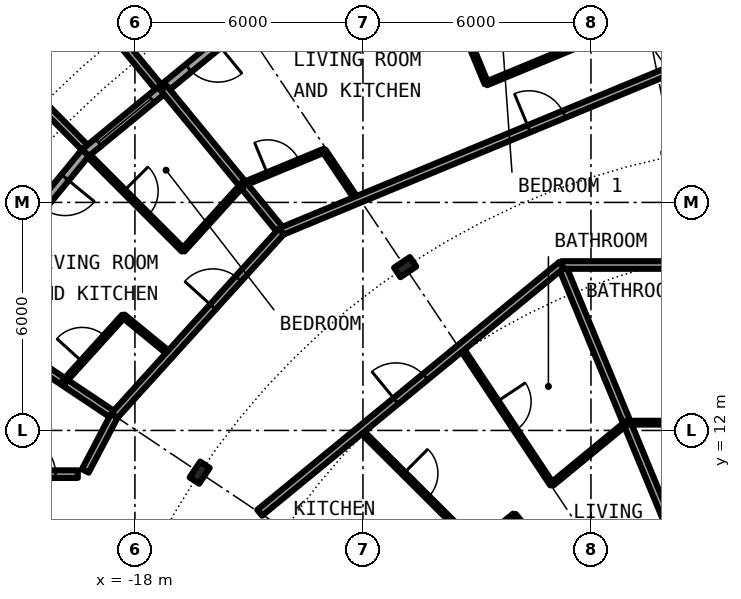
"""IFC4 building model, lengths in metres.
Left out: names, types, materials, properties, quantities, classifications, styles, units other than length and angle.
Written with IfcOpenShell. Run it as: python <this file> out.ifc"""

import sys

from ifc_helpers import new_model, si_unit, direction, frame, frame_2d, origin, origin_2d, place, context, subcontext, project, spatial, rectangle, circle, i_section, extrude, element, fill, save


model = new_model("IFC4")
c1 = context("Model", 3, precision=1e-05, world=origin(), true_north=direction((0.0, 1.0)))
c2 = subcontext(c1, "Body", "Model", "MODEL_VIEW")
j1 = project(units=[si_unit("LENGTHUNIT", "METRE"), si_unit("PLANEANGLEUNIT", "RADIAN")], contexts=[c1])
p1 = place(None, origin())
s1 = spatial("IfcSite", under=j1, at=p1, CompositionType="ELEMENT")
p2 = place(p1, origin())
s2 = spatial("IfcBuilding", under=s1, at=p2, CompositionType="ELEMENT")
p3 = place(p2, frame((0.0, 0.0, 173.8)))
s3 = spatial("IfcBuildingStorey", under=s2, at=p3, CompositionType="ELEMENT", Elevation=173.8)
for number, where, z_axis, x_axis in (
    (1, (-10.889, 16.297, 0.0), (0.0, 0.0, 1.0), (-0.556, 0.831, 0.0)),
    (2, (-16.297, 10.889, 0.0), (0.0, 0.0, 1.0), (-0.831, 0.556, 0.0)),
):
    element("IfcColumn", number, at=place(p3, frame(where, z_axis=z_axis, x_axis=x_axis)), inside=s3, PredefinedType="COLUMN", context=c2, shape_type="SweptSolid", body=[
        extrude(i_section(OverallWidth=0.3, OverallDepth=0.5, WebThickness=0.014, FlangeThickness=0.028, FilletRadius=0.027, at=origin_2d()), origin(), (0.0, 0.0, 1.0), 3.05),
    ])
p4 = place(p3, frame((-15.167, 22.699, 0.0), z_axis=(0.0, 0.0, 1.0), x_axis=(-0.773019449054, -0.634382322723, 0.0)))
e3 = element("IfcWall", 3, at=p4, inside=s3, PredefinedType="SOLIDWALL", context=c2, shape_type="SweptSolid", body=[
    extrude(rectangle(XDim=5.352, YDim=0.25, at=frame_2d((2.676, 0.0))), origin(), (0.0, 0.0, 1.0), 2.7),
])
p5 = place(p4, frame((0.841, 0.0, 0.0)))
e4 = element("IfcOpeningElement", 4, at=p5, cuts=e3, PredefinedType="OPENING", context=c2, shape_type="SweptSolid", body=[
    extrude(rectangle(XDim=1.0, YDim=2.2, at=frame_2d((0.5, 1.1))), frame((0.0, 0.135, 0.0), z_axis=(0.0, -1.0, 0.0), x_axis=(1.0, 0.0, 0.0)), (0.0, 0.0, 1.0), 0.27),
])
p6 = place(p4, frame((3.111, 0.0, 0.3)))
e5 = element("IfcOpeningElement", 5, at=p6, cuts=e3, PredefinedType="OPENING", context=c2, shape_type="SweptSolid", body=[
    extrude(rectangle(XDim=1.8, YDim=2.1, at=frame_2d((0.9, 1.05))), frame((0.0, 0.135, 0.0), z_axis=(0.0, -1.0, 0.0), x_axis=(1.0, 0.0, 0.0)), (0.0, 0.0, 1.0), 0.27),
])
p7 = place(p3, frame((-19.282, 23.503, -0.03), z_axis=(0.0, 0.0, 1.0), x_axis=(-0.740998365753, -0.671506829416, 0.0)))
e6 = element("IfcWall", 6, at=p7, inside=s3, PredefinedType="SOLIDWALL", context=c2, shape_type="SweptSolid", body=[
    extrude(rectangle(XDim=2.993, YDim=0.2, at=frame_2d((1.497, 0.0))), origin(), (0.0, 0.0, 1.0), 2.73),
])
p8 = place(p7, frame((0.457, 0.0, 0.33)))
e7 = element("IfcOpeningElement", 7, at=p8, cuts=e6, PredefinedType="OPENING", context=c2, shape_type="SweptSolid", body=[
    extrude(circle(Radius=1.04, at=frame_2d((1.04, 1.04))), frame((0.0, 0.11, 0.0), z_axis=(0.0, -1.0, 0.0), x_axis=(1.0, 0.0, 0.0)), (0.0, 0.0, 1.0), 0.22),
])
p9 = place(p3, frame((-17.384, 21.041, -0.03), z_axis=(0.0, 0.0, 1.0), x_axis=(-0.63709551667, 0.770784861449, 0.0)))
e8 = element("IfcWall", 8, at=p9, inside=s3, PredefinedType="SOLIDWALL", context=c2, shape_type="SweptSolid", body=[
    extrude(rectangle(XDim=3.006, YDim=0.2, at=frame_2d((1.503, 0.0))), origin(), (0.0, 0.0, 1.0), 2.73),
])
p10 = place(p3, frame((-19.323, 19.45, -0.03), z_axis=(0.0, 0.0, 1.0), x_axis=(-0.704476739375, 0.709727076896, 0.0)))
e9 = element("IfcWall", 9, at=p10, inside=s3, PredefinedType="SOLIDWALL", context=c2, shape_type="SweptSolid", body=[
    extrude(rectangle(XDim=2.883, YDim=0.2, at=frame_2d((1.441, 0.0))), origin(), (0.0, 0.0, 1.0), 2.73),
])
p11 = place(p3, frame((-19.304, 19.304, 0.0), z_axis=(0.0, 0.0, 1.0), x_axis=(-0.634382322723, -0.773019449054, 0.0)))
e10 = element("IfcWall", 10, at=p11, inside=s3, PredefinedType="SOLIDWALL", context=c2, shape_type="SweptSolid", body=[
    extrude(rectangle(XDim=5.352, YDim=0.25, at=frame_2d((2.676, 0.0))), origin(), (0.0, 0.0, 1.0), 2.7),
])
p12 = place(p11, frame((0.841, 0.0, 0.0)))
e11 = element("IfcOpeningElement", 11, at=p12, cuts=e10, PredefinedType="OPENING", context=c2, shape_type="SweptSolid", body=[
    extrude(rectangle(XDim=1.0, YDim=2.2, at=frame_2d((0.5, 1.1))), frame((0.0, 0.135, 0.0), z_axis=(0.0, -1.0, 0.0), x_axis=(1.0, 0.0, 0.0)), (0.0, 0.0, 1.0), 0.27),
])
p13 = place(p11, frame((3.111, 0.0, 0.3)))
e12 = element("IfcOpeningElement", 12, at=p13, cuts=e10, PredefinedType="OPENING", context=c2, shape_type="SweptSolid", body=[
    extrude(rectangle(XDim=1.8, YDim=2.1, at=frame_2d((0.9, 1.05))), frame((0.0, 0.135, 0.0), z_axis=(0.0, -1.0, 0.0), x_axis=(1.0, 0.0, 0.0)), (0.0, 0.0, 1.0), 0.27),
])
p14 = place(p3, frame((-8.019, 9.771, 0.0), z_axis=(0.0, 0.0, 1.0), x_axis=(0.633851064378, -0.773455123577, 0.0)))
e13 = element("IfcWall", 13, at=p14, inside=s3, PredefinedType="PARTITIONING", context=c2, shape_type="SweptSolid", body=[
    extrude(rectangle(XDim=4.919, YDim=0.1, at=frame_2d((2.46, 0.0))), origin(), (0.0, 0.0, 1.0), 2.7),
])
p15 = place(p14, frame((2.01, 0.0, 0.0)))
e14 = element("IfcOpeningElement", 14, at=p15, cuts=e13, PredefinedType="OPENING", context=c2, shape_type="SweptSolid", body=[
    extrude(rectangle(XDim=0.9, YDim=2.3, at=frame_2d((0.45, 1.15))), frame((0.0, 0.06, 0.0), z_axis=(0.0, -1.0, 0.0), x_axis=(1.0, 0.0, 0.0)), (0.0, 0.0, 1.0), 0.12),
])
p16 = place(p3, frame((-22.595, 15.098, 0.0), z_axis=(0.0, 0.0, 1.0), x_axis=(0.831387096605, -0.55569370664, 0.0)))
e15 = element("IfcWall", 15, at=p16, inside=s3, PredefinedType="PARTITIONING", context=c2, shape_type="SweptSolid", body=[
    extrude(rectangle(XDim=4.875, YDim=0.2, at=frame_2d((2.438, 0.0))), origin(), (0.0, 0.0, 1.0), 2.7),
])
p17 = place(p3, frame((-19.21, 19.222, 0.0), z_axis=(0.0, 0.0, 1.0), x_axis=(0.706967463531, -0.707246071398, 0.0)))
e16 = element("IfcWall", 16, at=p17, inside=s3, PredefinedType="PARTITIONING", context=c2, shape_type="SweptSolid", body=[
    extrude(rectangle(XDim=3.505, YDim=0.1, at=frame_2d((1.752, 0.0))), origin(), (0.0, 0.0, 1.0), 2.7),
])
p18 = place(p17, frame((1.303, 0.0, 0.0)))
e17 = element("IfcOpeningElement", 17, at=p18, cuts=e16, PredefinedType="OPENING", context=c2, shape_type="SweptSolid", body=[
    extrude(rectangle(XDim=0.9, YDim=2.3, at=frame_2d((0.45, 1.15))), frame((0.0, 0.06, 0.0), z_axis=(0.0, -1.0, 0.0), x_axis=(1.0, 0.0, 0.0)), (0.0, 0.0, 1.0), 0.12),
])
p19 = place(p3, frame((-17.24, 21.007, 0.0), z_axis=(0.0, 0.0, 1.0), x_axis=(0.634374159378, -0.773026148273, 0.0)))
e18 = element("IfcWall", 18, at=p19, inside=s3, PredefinedType="PARTITIONING", context=c2, shape_type="SweptSolid", body=[
    extrude(rectangle(XDim=4.876, YDim=0.2, at=frame_2d((2.438, 0.0))), origin(), (0.0, 0.0, 1.0), 2.7),
])
p20 = place(p3, frame((-13.025, 19.36, 0.0), z_axis=(0.0, 0.0, 1.0), x_axis=(0.558121913892, -0.829758958514, 0.0)))
e19 = element("IfcWall", 19, at=p20, inside=s3, PredefinedType="PARTITIONING", context=c2, shape_type="SweptSolid", body=[
    extrude(rectangle(XDim=1.562, YDim=0.1, at=frame_2d((0.781, 0.0))), origin(), (0.0, 0.0, 1.0), 2.7),
])
p21 = place(p3, frame((-12.069, 12.007, 0.0), z_axis=(0.0, 0.0, 1.0), x_axis=(0.708822693149, -0.705386695138, 0.0)))
e20 = element("IfcWall", 20, at=p21, inside=s3, PredefinedType="PARTITIONING", context=c2, shape_type="SweptSolid", body=[
    extrude(rectangle(XDim=4.121, YDim=0.1, at=frame_2d((2.061, 0.0))), origin(), (0.0, 0.0, 1.0), 2.7),
])
p22 = place(p21, frame((1.611, 0.0, 0.0)))
e21 = element("IfcOpeningElement", 21, at=p22, cuts=e20, PredefinedType="OPENING", context=c2, shape_type="SweptSolid", body=[
    extrude(rectangle(XDim=0.9, YDim=2.3, at=frame_2d((0.45, 1.15))), frame((0.0, 0.06, 0.0), z_axis=(0.0, -1.0, 0.0), x_axis=(1.0, 0.0, 0.0)), (0.0, 0.0, 1.0), 0.12),
])
p23 = place(p3, frame((-10.399, 25.106, 0.0), z_axis=(0.0, 0.0, 1.0), x_axis=(0.382689142274, -0.923877167369, 0.0)))
e22 = element("IfcWall", 22, at=p23, inside=s3, PredefinedType="PARTITIONING", context=c2, shape_type="SweptSolid", body=[
    extrude(rectangle(XDim=4.304, YDim=0.1, at=frame_2d((2.152, 0.0))), origin(), (0.0, 0.0, 1.0), 2.7),
])
p24 = place(p23, frame((1.702, 0.0, 0.0)))
e23 = element("IfcOpeningElement", 23, at=p24, cuts=e22, PredefinedType="OPENING", context=c2, shape_type="SweptSolid", body=[
    extrude(rectangle(XDim=0.9, YDim=2.3, at=frame_2d((0.45, 1.15))), frame((0.0, 0.06, 0.0), z_axis=(0.0, -1.0, 0.0), x_axis=(1.0, 0.0, 0.0)), (0.0, 0.0, 1.0), 0.12),
])
p25 = place(p3, frame((-9.421, 14.18, 0.0), z_axis=(0.0, 0.0, 1.0), x_axis=(0.553303732327, -0.832979579457, 0.0)))
e24 = element("IfcWall", 24, at=p25, inside=s3, PredefinedType="PARTITIONING", context=c2, shape_type="SweptSolid", body=[
    extrude(rectangle(XDim=4.319, YDim=0.1, at=frame_2d((2.16, 0.0))), origin(), (0.0, 0.0, 1.0), 2.7),
])
p26 = place(p25, frame((1.71, 0.0, 0.0)))
e25 = element("IfcOpeningElement", 25, at=p26, cuts=e24, PredefinedType="OPENING", context=c2, shape_type="SweptSolid", body=[
    extrude(rectangle(XDim=0.9, YDim=2.3, at=frame_2d((0.45, 1.15))), frame((0.0, 0.06, 0.0), z_axis=(0.0, -1.0, 0.0), x_axis=(1.0, 0.0, 0.0)), (0.0, 0.0, 1.0), 0.12),
])
p27 = place(p3, frame((-6.773, 16.353, 0.0), z_axis=(0.0, 0.0, 1.0), x_axis=(0.382632652025, -0.923900564782, 0.0)))
e26 = element("IfcWall", 26, at=p27, inside=s3, PredefinedType="PARTITIONING", context=c2, shape_type="SweptSolid", body=[
    extrude(rectangle(XDim=9.98, YDim=0.2, at=frame_2d((4.99, 0.0))), origin(), (0.0, 0.0, 1.0), 2.7),
])
p28 = place(p3, frame((-18.302, 15.01, 0.0), z_axis=(0.0, 0.0, 1.0), x_axis=(0.773476341377, -0.633825172528, 0.0)))
e27 = element("IfcWall", 27, at=p28, inside=s3, PredefinedType="PARTITIONING", context=c2, shape_type="SweptSolid", body=[
    extrude(rectangle(XDim=1.584, YDim=0.1, at=frame_2d((0.792, 0.0))), origin(), (0.0, 0.0, 1.0), 2.7),
])
p29 = place(p3, frame((-21.675, 10.85, 0.0), z_axis=(0.0, 0.0, 1.0), x_axis=(1.0, 0.0, 0.0)))
e28 = element("IfcWall", 28, at=p29, inside=s3, PredefinedType="PARTITIONING", context=c2, shape_type="SweptSolid", body=[
    extrude(rectangle(XDim=2.171, YDim=0.2, at=frame_2d((1.085, 0.0))), origin(), (0.0, 0.0, 1.0), 2.7),
])
p30 = place(p29, frame((0.585, 0.0, 0.0)))
e29 = element("IfcOpeningElement", 29, at=p30, cuts=e28, PredefinedType="OPENING", context=c2, shape_type="SweptSolid", body=[
    extrude(rectangle(XDim=1.0, YDim=2.3, at=frame_2d((0.5, 1.15))), frame((0.0, 0.11, 0.0), z_axis=(0.0, -1.0, 0.0), x_axis=(1.0, 0.0, 0.0)), (0.0, 0.0, 1.0), 0.22),
])
p31 = place(p3, frame((-5.055, 12.204, 0.0), z_axis=(0.0, 0.0, 1.0), x_axis=(1.0, 0.0, 0.0)))
e30 = element("IfcWall", 30, at=p31, inside=s3, PredefinedType="PARTITIONING", context=c2, shape_type="SweptSolid", body=[
    extrude(rectangle(XDim=2.528, YDim=0.1, at=frame_2d((1.264, 0.0))), origin(), (0.0, 0.0, 1.0), 2.7),
])
p32 = place(p3, frame((-8.842, 9.095, 0.0), z_axis=(0.0, 0.0, 1.0), x_axis=(0.772730269942, 0.634734534995, 0.0)))
e31 = element("IfcWall", 31, at=p32, inside=s3, PredefinedType="PARTITIONING", context=c2, shape_type="SweptSolid", body=[
    extrude(rectangle(XDim=1.065, YDim=0.1, at=frame_2d((0.532, 0.0))), origin(), (0.0, 0.0, 1.0), 2.7),
])
p33 = place(p3, frame((-7.034, 10.58, 0.0), z_axis=(0.0, 0.0, 1.0), x_axis=(0.772764723682, 0.634692588449, 0.0)))
e32 = element("IfcWall", 32, at=p33, inside=s3, PredefinedType="PARTITIONING", context=c2, shape_type="SweptSolid", body=[
    extrude(rectangle(XDim=2.557, YDim=0.1, at=frame_2d((1.278, 0.0))), origin(), (0.0, 0.0, 1.0), 2.7),
])
p34 = place(p3, frame((-6.773, 16.353, 0.0), z_axis=(0.0, 0.0, 1.0), x_axis=(1.0, 0.0, 0.0)))
e33 = element("IfcWall", 33, at=p34, inside=s3, PredefinedType="PARTITIONING", context=c2, shape_type="SweptSolid", body=[
    extrude(rectangle(XDim=13.546, YDim=0.2, at=frame_2d((6.773, 0.0))), origin(), (0.0, 0.0, 1.0), 2.7),
])
p35 = place(p34, frame((4.579, 0.0, 0.0)))
e34 = element("IfcOpeningElement", 34, at=p35, cuts=e33, PredefinedType="OPENING", context=c2, shape_type="SweptSolid", body=[
    extrude(rectangle(XDim=1.0, YDim=2.3, at=frame_2d((0.5, 1.15))), frame((0.0, 0.11, 0.0), z_axis=(0.0, -1.0, 0.0), x_axis=(1.0, 0.0, 0.0)), (0.0, 0.0, 1.0), 0.22),
])
p36 = place(p3, frame((-14.717, 9.834, 0.0), z_axis=(0.0, 0.0, 1.0), x_axis=(0.773034536097, 0.634363938131, 0.0)))
e35 = element("IfcWall", 35, at=p36, inside=s3, PredefinedType="PARTITIONING", context=c2, shape_type="SweptSolid", body=[
    extrude(rectangle(XDim=10.277, YDim=0.2, at=frame_2d((5.138, 0.0))), origin(), (0.0, 0.0, 1.0), 2.7),
])
p37 = place(p36, frame((4.638, 0.0, 0.0)))
e36 = element("IfcOpeningElement", 36, at=p37, cuts=e35, PredefinedType="OPENING", context=c2, shape_type="SweptSolid", body=[
    extrude(rectangle(XDim=1.0, YDim=2.3, at=frame_2d((0.5, 1.15))), frame((0.0, 0.11, 0.0), z_axis=(0.0, -1.0, 0.0), x_axis=(1.0, 0.0, 0.0)), (0.0, 0.0, 1.0), 0.22),
])
p38 = place(p3, frame((-14.147, 17.238, 0.0), z_axis=(0.0, 0.0, 1.0), x_axis=(0.923860535822, 0.382729291212, 0.0)))
e37 = element("IfcWall", 37, at=p38, inside=s3, PredefinedType="PARTITIONING", context=c2, shape_type="SweptSolid", body=[
    extrude(rectangle(XDim=12.947, YDim=0.2, at=frame_2d((6.473, 0.0))), origin(), (0.0, 0.0, 1.0), 2.7),
])
p39 = place(p38, frame((7.053, 0.0, 0.0)))
e38 = element("IfcOpeningElement", 38, at=p39, cuts=e37, PredefinedType="OPENING", context=c2, shape_type="SweptSolid", body=[
    extrude(rectangle(XDim=1.0, YDim=2.3, at=frame_2d((0.5, 1.15))), frame((0.0, 0.11, 0.0), z_axis=(0.0, -1.0, 0.0), x_axis=(1.0, 0.0, 0.0)), (0.0, 0.0, 1.0), 0.22),
])
p40 = place(p3, frame((-18.542, 12.389, 0.0), z_axis=(0.0, 0.0, 1.0), x_axis=(0.671561669125, 0.740948665268, 0.0)))
e39 = element("IfcWall", 39, at=p40, inside=s3, PredefinedType="PARTITIONING", context=c2, shape_type="SweptSolid", body=[
    extrude(rectangle(XDim=6.544, YDim=0.2, at=frame_2d((3.272, 0.0))), origin(), (0.0, 0.0, 1.0), 2.7),
])
p41 = place(p40, frame((3.862, 0.0, 0.0)))
e40 = element("IfcOpeningElement", 40, at=p41, cuts=e39, PredefinedType="OPENING", context=c2, shape_type="SweptSolid", body=[
    extrude(rectangle(XDim=1.0, YDim=2.3, at=frame_2d((0.5, 1.15))), frame((0.0, 0.11, 0.0), z_axis=(0.0, -1.0, 0.0), x_axis=(1.0, 0.0, 0.0)), (0.0, 0.0, 1.0), 0.22),
])
p42 = place(p3, frame((-19.307, 10.935, 0.0), z_axis=(0.0, 0.0, 1.0), x_axis=(0.465605550524, 0.884992356646, 0.0)))
e41 = element("IfcWall", 41, at=p42, inside=s3, PredefinedType="PARTITIONING", context=c2, shape_type="SweptSolid", body=[
    extrude(rectangle(XDim=1.643, YDim=0.2, at=frame_2d((0.821, 0.0))), origin(), (0.0, 0.0, 1.0), 2.7),
])
p43 = place(p3, frame((-15.162, 18.475, 0.0), z_axis=(0.0, 0.0, 1.0), x_axis=(0.923917795213, 0.382591044968, 0.0)))
e42 = element("IfcWall", 42, at=p43, inside=s3, PredefinedType="PARTITIONING", context=c2, shape_type="SweptSolid", body=[
    extrude(rectangle(XDim=2.313, YDim=0.1, at=frame_2d((1.157, 0.0))), origin(), (0.0, 0.0, 1.0), 2.7),
])
p44 = place(p43, frame((0.707, 0.0, 0.0)))
e43 = element("IfcOpeningElement", 43, at=p44, cuts=e42, PredefinedType="OPENING", context=c2, shape_type="SweptSolid", body=[
    extrude(rectangle(XDim=0.9, YDim=2.3, at=frame_2d((0.45, 1.15))), frame((0.0, 0.06, 0.0), z_axis=(0.0, -1.0, 0.0), x_axis=(1.0, 0.0, 0.0)), (0.0, 0.0, 1.0), 0.12),
])
p45 = place(p3, frame((-8.75, 21.131, 0.0), z_axis=(0.0, 0.0, 1.0), x_axis=(0.923964526154, 0.382478175075, 0.0)))
e44 = element("IfcWall", 44, at=p45, inside=s3, PredefinedType="PARTITIONING", context=c2, shape_type="SweptSolid", body=[
    extrude(rectangle(XDim=6.938, YDim=0.1, at=frame_2d((3.469, 0.0))), origin(), (0.0, 0.0, 1.0), 2.7),
])
p46 = place(p45, frame((3.015, 0.0, 0.0)))
e45 = element("IfcOpeningElement", 45, at=p46, cuts=e44, PredefinedType="OPENING", context=c2, shape_type="SweptSolid", body=[
    extrude(rectangle(XDim=0.9, YDim=2.3, at=frame_2d((0.45, 1.15))), frame((0.0, 0.06, 0.0), z_axis=(0.0, -1.0, 0.0), x_axis=(1.0, 0.0, 0.0)), (0.0, 0.0, 1.0), 0.12),
])
p47 = place(p45, frame((5.33, 0.0, 0.0)))
e46 = element("IfcOpeningElement", 46, at=p47, cuts=e44, PredefinedType="OPENING", context=c2, shape_type="SweptSolid", body=[
    extrude(rectangle(XDim=0.9, YDim=2.3, at=frame_2d((0.45, 1.15))), frame((0.0, 0.06, 0.0), z_axis=(0.0, -1.0, 0.0), x_axis=(1.0, 0.0, 0.0)), (0.0, 0.0, 1.0), 0.12),
])
p48 = place(p3, frame((-19.872, 13.278, 0.0), z_axis=(0.0, 0.0, 1.0), x_axis=(0.671637685376, 0.740879760544, 0.0)))
e47 = element("IfcWall", 47, at=p48, inside=s3, PredefinedType="PARTITIONING", context=c2, shape_type="SweptSolid", body=[
    extrude(rectangle(XDim=2.338, YDim=0.1, at=frame_2d((1.169, 0.0))), origin(), (0.0, 0.0, 1.0), 2.7),
])
p49 = place(p48, frame((0.719, 0.0, 0.0)))
e48 = element("IfcOpeningElement", 48, at=p49, cuts=e47, PredefinedType="OPENING", context=c2, shape_type="SweptSolid", body=[
    extrude(rectangle(XDim=0.9, YDim=2.3, at=frame_2d((0.45, 1.15))), frame((0.0, 0.06, 0.0), z_axis=(0.0, -1.0, 0.0), x_axis=(1.0, 0.0, 0.0)), (0.0, 0.0, 1.0), 0.12),
])
p50 = place(p3, frame((-16.732, 16.743, 0.0), z_axis=(0.0, 0.0, 1.0), x_axis=(0.671528384412, 0.740978831634, 0.0)))
e49 = element("IfcWall", 49, at=p50, inside=s3, PredefinedType="PARTITIONING", context=c2, shape_type="SweptSolid", body=[
    extrude(rectangle(XDim=2.338, YDim=0.1, at=frame_2d((1.169, 0.0))), origin(), (0.0, 0.0, 1.0), 2.7),
])
p51 = place(p5, origin())
e50 = element("IfcDoor", 50, at=p51, inside=s3, OperationType="SINGLE_SWING_LEFT", PredefinedType="DOOR", context=c2, shape_type="SweptSolid", body=[
    extrude(rectangle(XDim=1.0, YDim=2.2, at=frame_2d((0.5, 1.1))), frame((0.0, 0.025, 0.0), z_axis=(0.0, -1.0, 0.0), x_axis=(1.0, 0.0, 0.0)), (0.0, 0.0, 1.0), 0.05),
])
fill(e4, e50)
p52 = place(p6, origin())
e51 = element("IfcWindow", 51, at=p52, inside=s3, PartitioningType="SINGLE_PANEL", PredefinedType="WINDOW", context=c2, shape_type="SweptSolid", body=[
    extrude(rectangle(XDim=1.8, YDim=2.1, at=frame_2d((0.9, 1.05))), frame((0.0, 0.03, 0.0), z_axis=(0.0, -1.0, 0.0), x_axis=(1.0, 0.0, 0.0)), (0.0, 0.0, 1.0), 0.06),
])
fill(e5, e51)
p53 = place(p8, origin())
e52 = element("IfcWindow", 52, at=p53, inside=s3, PartitioningType="SINGLE_PANEL", PredefinedType="WINDOW", context=c2, shape_type="SweptSolid", body=[
    extrude(circle(Radius=1.04, at=frame_2d((1.04, 1.04))), frame((0.0, 0.03, 0.0), z_axis=(0.0, -1.0, 0.0), x_axis=(1.0, 0.0, 0.0)), (0.0, 0.0, 1.0), 0.06),
])
fill(e7, e52)
p54 = place(p12, origin())
e53 = element("IfcDoor", 53, at=p54, inside=s3, OperationType="SINGLE_SWING_LEFT", PredefinedType="DOOR", context=c2, shape_type="SweptSolid", body=[
    extrude(rectangle(XDim=1.0, YDim=2.2, at=frame_2d((0.5, 1.1))), frame((0.0, 0.025, 0.0), z_axis=(0.0, -1.0, 0.0), x_axis=(1.0, 0.0, 0.0)), (0.0, 0.0, 1.0), 0.05),
])
fill(e11, e53)
p55 = place(p39, origin())
e54 = element("IfcDoor", 54, at=p55, inside=s3, OperationType="SINGLE_SWING_RIGHT", PredefinedType="DOOR", context=c2, shape_type="SweptSolid", body=[
    extrude(rectangle(XDim=1.0, YDim=2.3, at=frame_2d((0.5, 1.15))), frame((0.0, 0.025, 0.0), z_axis=(0.0, -1.0, 0.0), x_axis=(1.0, 0.0, 0.0)), (0.0, 0.0, 1.0), 0.05),
])
fill(e38, e54)
p56 = place(p44, origin())
e55 = element("IfcDoor", 55, at=p56, inside=s3, OperationType="SINGLE_SWING_LEFT", PredefinedType="DOOR", context=c2, shape_type="SweptSolid", body=[
    extrude(rectangle(XDim=0.9, YDim=2.3, at=frame_2d((0.45, 1.15))), frame((0.0, 0.025, 0.0), z_axis=(0.0, -1.0, 0.0), x_axis=(1.0, 0.0, 0.0)), (0.0, 0.0, 1.0), 0.05),
])
fill(e43, e55)
p57 = place(p41, origin())
e56 = element("IfcDoor", 56, at=p57, inside=s3, OperationType="SINGLE_SWING_RIGHT", PredefinedType="DOOR", context=c2, shape_type="SweptSolid", body=[
    extrude(rectangle(XDim=1.0, YDim=2.3, at=frame_2d((0.5, 1.15))), frame((0.0, 0.025, 0.0), z_axis=(0.0, -1.0, 0.0), x_axis=(1.0, 0.0, 0.0)), (0.0, 0.0, 1.0), 0.05),
])
fill(e40, e56)
p58 = place(p49, origin())
e57 = element("IfcDoor", 57, at=p58, inside=s3, OperationType="SINGLE_SWING_LEFT", PredefinedType="DOOR", context=c2, shape_type="SweptSolid", body=[
    extrude(rectangle(XDim=0.9, YDim=2.3, at=frame_2d((0.45, 1.15))), frame((0.0, 0.025, 0.0), z_axis=(0.0, -1.0, 0.0), x_axis=(1.0, 0.0, 0.0)), (0.0, 0.0, 1.0), 0.05),
])
fill(e48, e57)
p59 = place(p18, origin())
e58 = element("IfcDoor", 58, at=p59, inside=s3, OperationType="SINGLE_SWING_LEFT", PredefinedType="DOOR", context=c2, shape_type="SweptSolid", body=[
    extrude(rectangle(XDim=0.9, YDim=2.3, at=frame_2d((0.45, 1.15))), frame((0.0, 0.025, 0.0), z_axis=(0.0, -1.0, 0.0), x_axis=(1.0, 0.0, 0.0)), (0.0, 0.0, 1.0), 0.05),
])
fill(e17, e58)
p60 = place(p37, origin())
e59 = element("IfcDoor", 59, at=p60, inside=s3, OperationType="SINGLE_SWING_LEFT", PredefinedType="DOOR", context=c2, shape_type="SweptSolid", body=[
    extrude(rectangle(XDim=1.0, YDim=2.3, at=frame_2d((0.5, 1.15))), frame((0.0, 0.025, 0.0), z_axis=(0.0, -1.0, 0.0), x_axis=(1.0, 0.0, 0.0)), (0.0, 0.0, 1.0), 0.05),
])
fill(e36, e59)
p61 = place(p26, origin())
e60 = element("IfcDoor", 60, at=p61, inside=s3, OperationType="SINGLE_SWING_RIGHT", PredefinedType="DOOR", context=c2, shape_type="SweptSolid", body=[
    extrude(rectangle(XDim=0.9, YDim=2.3, at=frame_2d((0.45, 1.15))), frame((0.0, 0.025, 0.0), z_axis=(0.0, -1.0, 0.0), x_axis=(1.0, 0.0, 0.0)), (0.0, 0.0, 1.0), 0.05),
])
fill(e25, e60)
p62 = place(p22, origin())
e61 = element("IfcDoor", 61, at=p62, inside=s3, OperationType="SINGLE_SWING_RIGHT", PredefinedType="DOOR", context=c2, shape_type="SweptSolid", body=[
    extrude(rectangle(XDim=0.9, YDim=2.3, at=frame_2d((0.45, 1.15))), frame((0.0, 0.025, 0.0), z_axis=(0.0, -1.0, 0.0), x_axis=(1.0, 0.0, 0.0)), (0.0, 0.0, 1.0), 0.05),
])
fill(e21, e61)
p63 = place(p30, origin())
e62 = element("IfcDoor", 62, at=p63, inside=s3, OperationType="SINGLE_SWING_LEFT", PredefinedType="DOOR", context=c2, shape_type="SweptSolid", body=[
    extrude(rectangle(XDim=1.0, YDim=2.3, at=frame_2d((0.5, 1.15))), frame((0.0, 0.025, 0.0), z_axis=(0.0, -1.0, 0.0), x_axis=(1.0, 0.0, 0.0)), (0.0, 0.0, 1.0), 0.05),
])
fill(e29, e62)
save(model, sys.argv[1])
